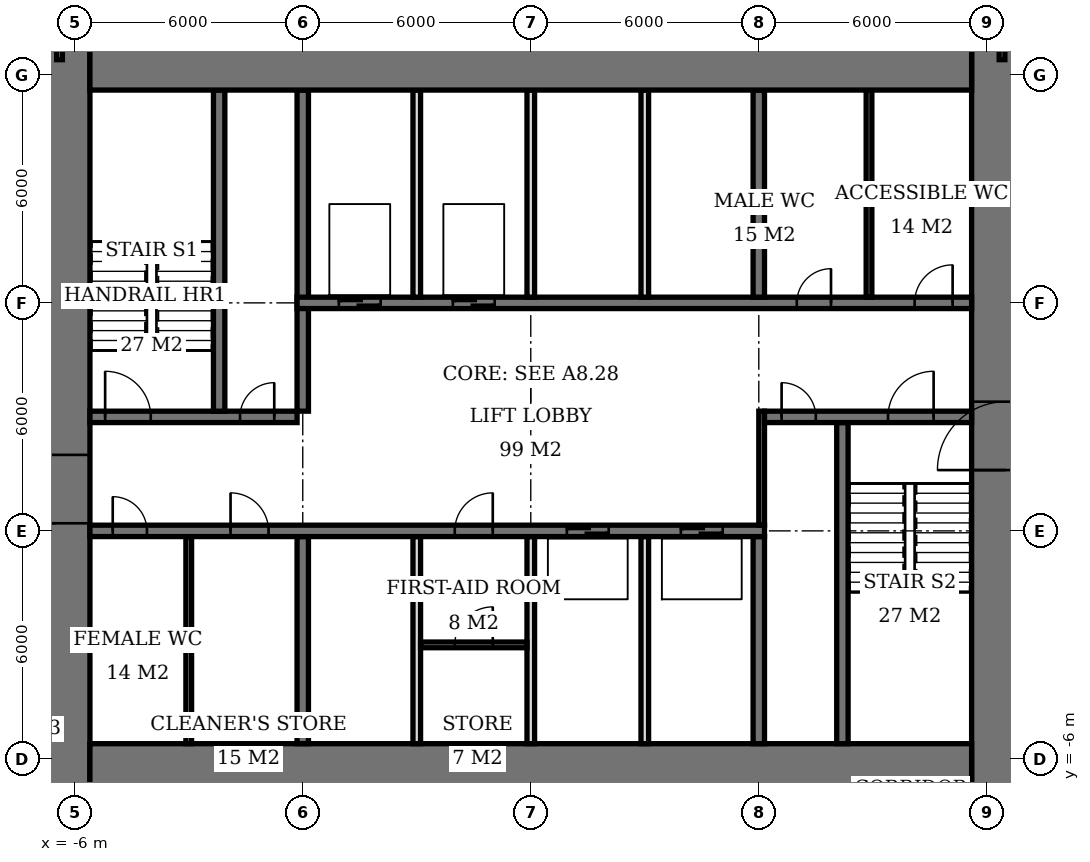
"""IFC4 building model, lengths in metres.
Left out: names, types, materials, properties, quantities, classifications, styles, units other than length and angle.
Written with IfcOpenShell. Run it as: python <this file> out.ifc"""

import sys

from ifc_helpers import new_model, si_unit, direction, frame, frame_2d, origin, place, context, subcontext, project, spatial, rectangle, extrude, element, fill, save


model = new_model("IFC4")
c1 = context("Model", 3, precision=1e-05, world=origin(), true_north=direction((0.0, 1.0)))
c2 = subcontext(c1, "Body", "Model", "MODEL_VIEW")
j1 = project(units=[si_unit("LENGTHUNIT", "METRE"), si_unit("PLANEANGLEUNIT", "RADIAN")], contexts=[c1])
p1 = place(None, origin())
s1 = spatial("IfcSite", under=j1, at=p1, CompositionType="ELEMENT")
p2 = place(p1, origin())
s2 = spatial("IfcBuilding", under=s1, at=p2, CompositionType="ELEMENT")
p3 = place(p2, frame((0.0, 0.0, 276.2)))
s3 = spatial("IfcBuildingStorey", under=s2, at=p3, CompositionType="ELEMENT", Elevation=276.2)
for number, where, z_axis, x_axis in (
    (1, (-5.6, -6.6, 0.0), (0.0, 0.0, 1.0), (1.0, 0.0, 0.0)),
    (2, (-5.6, 12.6, 0.0), (0.0, 0.0, 1.0), (1.0, 0.0, 0.0)),
):
    element("IfcWall", number, at=place(p3, frame(where, z_axis=z_axis, x_axis=x_axis)), inside=s3, PredefinedType="SHEAR", context=c2, shape_type="SweptSolid", body=[
        extrude(rectangle(XDim=23.2, YDim=2.0, at=frame_2d((11.6, 0.0))), origin(), (0.0, 0.0, 1.0), 3.9),
    ])
p4 = place(p3, frame((-6.5, -7.6, 0.0), z_axis=(0.0, 0.0, 1.0), x_axis=(0.0, 1.0, 0.0)))
e3 = element("IfcWall", 3, at=p4, inside=s3, PredefinedType="SHEAR", context=c2, shape_type="SweptSolid", body=[
    extrude(rectangle(XDim=21.2, YDim=1.8, at=frame_2d((10.6, 0.0))), origin(), (0.0, 0.0, 1.0), 3.9),
])
p5 = place(p4, frame((7.8, 0.0, 0.0)))
e4 = element("IfcOpeningElement", 4, at=p5, cuts=e3, PredefinedType="OPENING", context=c2, shape_type="SweptSolid", body=[
    extrude(rectangle(XDim=1.8, YDim=2.4, at=frame_2d((0.9, 1.2))), frame((0.0, 0.91, 0.0), z_axis=(0.0, -1.0, 0.0), x_axis=(1.0, 0.0, 0.0)), (0.0, 0.0, 1.0), 1.82),
])
p6 = place(p3, frame((18.5, -7.6, 0.0), z_axis=(0.0, 0.0, 1.0), x_axis=(0.0, 1.0, 0.0)))
e5 = element("IfcWall", 5, at=p6, inside=s3, PredefinedType="SHEAR", context=c2, shape_type="SweptSolid", body=[
    extrude(rectangle(XDim=21.2, YDim=1.8, at=frame_2d((10.6, 0.0))), origin(), (0.0, 0.0, 1.0), 3.9),
])
p7 = place(p6, frame((9.2, 0.0, 0.0)))
e6 = element("IfcOpeningElement", 6, at=p7, cuts=e5, PredefinedType="OPENING", context=c2, shape_type="SweptSolid", body=[
    extrude(rectangle(XDim=1.8, YDim=2.4, at=frame_2d((0.9, 1.2))), frame((0.0, 0.91, 0.0), z_axis=(0.0, -1.0, 0.0), x_axis=(1.0, 0.0, 0.0)), (0.0, 0.0, 1.0), 1.82),
])
p8 = place(p3, frame((-5.6, 0.0, 0.0), z_axis=(0.0, 0.0, 1.0), x_axis=(1.0, 0.0, 0.0)))
e7 = element("IfcWall", 7, at=p8, inside=s3, PredefinedType="SHEAR", context=c2, shape_type="SweptSolid", body=[
    extrude(rectangle(XDim=17.75, YDim=0.3, at=frame_2d((8.875, 0.0))), origin(), (0.0, 0.0, 1.0), 3.9),
])
p9 = place(p8, frame((0.6, 0.0, 0.0)))
e8 = element("IfcOpeningElement", 8, at=p9, cuts=e7, PredefinedType="OPENING", context=c2, shape_type="SweptSolid", body=[
    extrude(rectangle(XDim=0.9, YDim=2.1, at=frame_2d((0.45, 1.05))), frame((0.0, 0.16, 0.0), z_axis=(0.0, -1.0, 0.0), x_axis=(1.0, 0.0, 0.0)), (0.0, 0.0, 1.0), 0.32),
])
p10 = place(p8, frame((3.7, 0.0, 0.0)))
e9 = element("IfcOpeningElement", 9, at=p10, cuts=e7, PredefinedType="OPENING", context=c2, shape_type="SweptSolid", body=[
    extrude(rectangle(XDim=1.0, YDim=2.1, at=frame_2d((0.5, 1.05))), frame((0.0, 0.16, 0.0), z_axis=(0.0, -1.0, 0.0), x_axis=(1.0, 0.0, 0.0)), (0.0, 0.0, 1.0), 0.32),
])
p11 = place(p8, frame((9.6, 0.0, 0.0)))
e10 = element("IfcOpeningElement", 10, at=p11, cuts=e7, PredefinedType="OPENING", context=c2, shape_type="SweptSolid", body=[
    extrude(rectangle(XDim=1.0, YDim=2.1, at=frame_2d((0.5, 1.05))), frame((0.0, 0.16, 0.0), z_axis=(0.0, -1.0, 0.0), x_axis=(1.0, 0.0, 0.0)), (0.0, 0.0, 1.0), 0.32),
])
p12 = place(p8, frame((12.55, 0.0, 0.0)))
e11 = element("IfcOpeningElement", 11, at=p12, cuts=e7, PredefinedType="OPENING", context=c2, shape_type="SweptSolid", body=[
    extrude(rectangle(XDim=1.1, YDim=2.1, at=frame_2d((0.55, 1.05))), frame((0.0, 0.16, 0.0), z_axis=(0.0, -1.0, 0.0), x_axis=(1.0, 0.0, 0.0)), (0.0, 0.0, 1.0), 0.32),
])
p13 = place(p8, frame((15.55, 0.0, 0.0)))
e12 = element("IfcOpeningElement", 12, at=p13, cuts=e7, PredefinedType="OPENING", context=c2, shape_type="SweptSolid", body=[
    extrude(rectangle(XDim=1.1, YDim=2.1, at=frame_2d((0.55, 1.05))), frame((0.0, 0.16, 0.0), z_axis=(0.0, -1.0, 0.0), x_axis=(1.0, 0.0, 0.0)), (0.0, 0.0, 1.0), 0.32),
])
p14 = place(p3, frame((-5.6, 3.0, 0.0), z_axis=(0.0, 0.0, 1.0), x_axis=(1.0, 0.0, 0.0)))
e13 = element("IfcWall", 13, at=p14, inside=s3, PredefinedType="SHEAR", context=c2, shape_type="SweptSolid", body=[
    extrude(rectangle(XDim=5.45, YDim=0.3, at=frame_2d((2.725, 0.0))), origin(), (0.0, 0.0, 1.0), 3.9),
])
p15 = place(p14, frame((0.4, 0.0, 0.0)))
e14 = element("IfcOpeningElement", 14, at=p15, cuts=e13, PredefinedType="OPENING", context=c2, shape_type="SweptSolid", body=[
    extrude(rectangle(XDim=1.2, YDim=2.1, at=frame_2d((0.6, 1.05))), frame((0.0, 0.16, 0.0), z_axis=(0.0, -1.0, 0.0), x_axis=(1.0, 0.0, 0.0)), (0.0, 0.0, 1.0), 0.32),
])
p16 = place(p14, frame((3.95, 0.0, 0.0)))
e15 = element("IfcOpeningElement", 15, at=p16, cuts=e13, PredefinedType="OPENING", context=c2, shape_type="SweptSolid", body=[
    extrude(rectangle(XDim=0.9, YDim=2.1, at=frame_2d((0.45, 1.05))), frame((0.0, 0.16, 0.0), z_axis=(0.0, -1.0, 0.0), x_axis=(1.0, 0.0, 0.0)), (0.0, 0.0, 1.0), 0.32),
])
p17 = place(p3, frame((12.15, 3.0, 0.0), z_axis=(0.0, 0.0, 1.0), x_axis=(1.0, 0.0, 0.0)))
e16 = element("IfcWall", 16, at=p17, inside=s3, PredefinedType="SHEAR", context=c2, shape_type="SweptSolid", body=[
    extrude(rectangle(XDim=5.45, YDim=0.3, at=frame_2d((2.725, 0.0))), origin(), (0.0, 0.0, 1.0), 3.9),
])
p18 = place(p17, frame((3.25, 0.0, 0.0)))
e17 = element("IfcOpeningElement", 17, at=p18, cuts=e16, PredefinedType="OPENING", context=c2, shape_type="SweptSolid", body=[
    extrude(rectangle(XDim=1.2, YDim=2.1, at=frame_2d((0.6, 1.05))), frame((0.0, 0.16, 0.0), z_axis=(0.0, -1.0, 0.0), x_axis=(1.0, 0.0, 0.0)), (0.0, 0.0, 1.0), 0.32),
])
p19 = place(p17, frame((0.45, 0.0, 0.0)))
e18 = element("IfcOpeningElement", 18, at=p19, cuts=e16, PredefinedType="OPENING", context=c2, shape_type="SweptSolid", body=[
    extrude(rectangle(XDim=0.9, YDim=2.1, at=frame_2d((0.45, 1.05))), frame((0.0, 0.16, 0.0), z_axis=(0.0, -1.0, 0.0), x_axis=(1.0, 0.0, 0.0)), (0.0, 0.0, 1.0), 0.32),
])
p20 = place(p3, frame((-0.15, 6.0, 0.0), z_axis=(0.0, 0.0, 1.0), x_axis=(1.0, 0.0, 0.0)))
e19 = element("IfcWall", 19, at=p20, inside=s3, PredefinedType="SHEAR", context=c2, shape_type="SweptSolid", body=[
    extrude(rectangle(XDim=17.75, YDim=0.3, at=frame_2d((8.875, 0.0))), origin(), (0.0, 0.0, 1.0), 3.9),
])
p21 = place(p20, frame((13.15, 0.0, 0.0)))
e20 = element("IfcOpeningElement", 20, at=p21, cuts=e19, PredefinedType="OPENING", context=c2, shape_type="SweptSolid", body=[
    extrude(rectangle(XDim=0.9, YDim=2.1, at=frame_2d((0.45, 1.05))), frame((0.0, 0.16, 0.0), z_axis=(0.0, -1.0, 0.0), x_axis=(1.0, 0.0, 0.0)), (0.0, 0.0, 1.0), 0.32),
])
p22 = place(p20, frame((16.25, 0.0, 0.0)))
e21 = element("IfcOpeningElement", 21, at=p22, cuts=e19, PredefinedType="OPENING", context=c2, shape_type="SweptSolid", body=[
    extrude(rectangle(XDim=1.0, YDim=2.1, at=frame_2d((0.5, 1.05))), frame((0.0, 0.16, 0.0), z_axis=(0.0, -1.0, 0.0), x_axis=(1.0, 0.0, 0.0)), (0.0, 0.0, 1.0), 0.32),
])
p23 = place(p20, frame((1.1, 0.0, 0.0)))
e22 = element("IfcOpeningElement", 22, at=p23, cuts=e19, PredefinedType="OPENING", context=c2, shape_type="SweptSolid", body=[
    extrude(rectangle(XDim=1.1, YDim=2.1, at=frame_2d((0.55, 1.05))), frame((0.0, 0.16, 0.0), z_axis=(0.0, -1.0, 0.0), x_axis=(1.0, 0.0, 0.0)), (0.0, 0.0, 1.0), 0.32),
])
p24 = place(p20, frame((4.1, 0.0, 0.0)))
e23 = element("IfcOpeningElement", 23, at=p24, cuts=e19, PredefinedType="OPENING", context=c2, shape_type="SweptSolid", body=[
    extrude(rectangle(XDim=1.1, YDim=2.1, at=frame_2d((0.55, 1.05))), frame((0.0, 0.16, 0.0), z_axis=(0.0, -1.0, 0.0), x_axis=(1.0, 0.0, 0.0)), (0.0, 0.0, 1.0), 0.32),
])
p25 = place(p3, frame((0.0, -5.6, 0.0), z_axis=(0.0, 0.0, 1.0), x_axis=(0.0, 1.0, 0.0)))
e24 = element("IfcWall", 24, at=p25, inside=s3, PredefinedType="SHEAR", context=c2, shape_type="SweptSolid", body=[
    extrude(rectangle(XDim=5.45, YDim=0.3, at=frame_2d((2.725, 0.0))), origin(), (0.0, 0.0, 1.0), 3.9),
])
p26 = place(p3, frame((0.0, 3.15, 0.0), z_axis=(0.0, 0.0, 1.0), x_axis=(0.0, 1.0, 0.0)))
e25 = element("IfcWall", 25, at=p26, inside=s3, PredefinedType="SHEAR", context=c2, shape_type="SweptSolid", body=[
    extrude(rectangle(XDim=8.45, YDim=0.3, at=frame_2d((4.225, 0.0))), origin(), (0.0, 0.0, 1.0), 3.9),
])
for number, where, z_axis, x_axis in (
    (26, (12.0, -5.6, 0.0), (0.0, 0.0, 1.0), (0.0, 1.0, 0.0)),
    (27, (12.0, 6.15, 0.0), (0.0, 0.0, 1.0), (0.0, 1.0, 0.0)),
):
    element("IfcWall", number, at=place(p3, frame(where, z_axis=z_axis, x_axis=x_axis)), inside=s3, PredefinedType="SHEAR", context=c2, shape_type="SweptSolid", body=[
        extrude(rectangle(XDim=5.45, YDim=0.3, at=frame_2d((2.725, 0.0))), origin(), (0.0, 0.0, 1.0), 3.9),
    ])
for number, where, z_axis, x_axis in (
    (28, (-2.2, 3.15, 0.0), (0.0, 0.0, 1.0), (0.0, 1.0, 0.0)),
    (29, (14.2, -5.6, 0.0), (0.0, 0.0, 1.0), (0.0, 1.0, 0.0)),
):
    element("IfcWall", number, at=place(p3, frame(where, z_axis=z_axis, x_axis=x_axis)), inside=s3, PredefinedType="SHEAR", context=c2, shape_type="SweptSolid", body=[
        extrude(rectangle(XDim=8.45, YDim=0.3, at=frame_2d((4.225, 0.0))), origin(), (0.0, 0.0, 1.0), 3.9),
    ])
for number, where, z_axis, x_axis in (
    (30, (3.0, 6.15, 0.0), (0.0, 0.0, 1.0), (0.0, 1.0, 0.0)),
    (31, (6.0, 6.15, 0.0), (0.0, 0.0, 1.0), (0.0, 1.0, 0.0)),
    (32, (9.0, 6.15, 0.0), (0.0, 0.0, 1.0), (0.0, 1.0, 0.0)),
    (33, (3.0, -5.6, 0.0), (0.0, 0.0, 1.0), (0.0, 1.0, 0.0)),
    (34, (6.0, -5.6, 0.0), (0.0, 0.0, 1.0), (0.0, 1.0, 0.0)),
    (35, (9.0, -5.6, 0.0), (0.0, 0.0, 1.0), (0.0, 1.0, 0.0)),
):
    element("IfcWall", number, at=place(p3, frame(where, z_axis=z_axis, x_axis=x_axis)), inside=s3, PredefinedType="SOLIDWALL", context=c2, shape_type="SweptSolid", body=[
        extrude(rectangle(XDim=5.45, YDim=0.2, at=frame_2d((2.725, 0.0))), origin(), (0.0, 0.0, 1.0), 3.9),
    ])
for number, where, z_axis, x_axis in (
    (36, (-3.0, -5.6, 0.0), (0.0, 0.0, 1.0), (0.0, 1.0, 0.0)),
    (37, (14.9, 6.15, 0.0), (0.0, 0.0, 1.0), (0.0, 1.0, 0.0)),
):
    element("IfcWall", number, at=place(p3, frame(where, z_axis=z_axis, x_axis=x_axis)), inside=s3, PredefinedType="PLUMBINGWALL", context=c2, shape_type="SweptSolid", body=[
        extrude(rectangle(XDim=5.45, YDim=0.15, at=frame_2d((2.725, 0.0))), origin(), (0.0, 0.0, 1.0), 3.65),
    ])
p27 = place(p3, frame((3.1, -3.0, 0.0), z_axis=(0.0, 0.0, 1.0), x_axis=(1.0, 0.0, 0.0)))
e38 = element("IfcWall", 38, at=p27, inside=s3, PredefinedType="PARTITIONING", context=c2, shape_type="SweptSolid", body=[
    extrude(rectangle(XDim=2.8, YDim=0.15, at=frame_2d((1.4, 0.0))), origin(), (0.0, 0.0, 1.0), 3.65),
])
p28 = place(p27, frame((0.9, 0.0, 0.0)))
e39 = element("IfcOpeningElement", 39, at=p28, cuts=e38, PredefinedType="OPENING", context=c2, shape_type="SweptSolid", body=[
    extrude(rectangle(XDim=1.0, YDim=2.1, at=frame_2d((0.5, 1.05))), frame((0.0, 0.085, 0.0), z_axis=(0.0, -1.0, 0.0), x_axis=(1.0, 0.0, 0.0)), (0.0, 0.0, 1.0), 0.17),
])
for number, where, z_axis, x_axis in (
    (40, (-6.4, 12.4, 0.0), (0.0, 0.0, 1.0), (0.0, 1.0, 0.0)),
    (41, (18.4, 12.4, 0.0), (0.0, 0.0, 1.0), (0.0, 1.0, 0.0)),
):
    element("IfcWall", number, at=place(p3, frame(where, z_axis=z_axis, x_axis=x_axis)), inside=s3, PredefinedType="PARTITIONING", context=c2, shape_type="SweptSolid", body=[
        extrude(rectangle(XDim=1.2, YDim=0.15, at=frame_2d((0.6, 0.0))), origin(), (0.0, 0.0, 1.0), 3.65),
    ])
p29 = place(p3, frame((12.075, 0.15, 0.0), z_axis=(0.0, 0.0, 1.0), x_axis=(0.0, 1.0, 0.0)))
e42 = element("IfcWall", 42, at=p29, inside=s3, PredefinedType="PARTITIONING", context=c2, shape_type="SweptSolid", body=[
    extrude(rectangle(XDim=3.0, YDim=0.15, at=frame_2d((1.5, 0.0))), origin(), (0.0, 0.0, 1.0), 3.65),
])
p30 = place(p5, origin())
e43 = element("IfcDoor", 43, at=p30, inside=s3, OperationType="DOUBLE_DOOR_SINGLE_SWING", PredefinedType="DOOR", context=c2, shape_type="SweptSolid", body=[
    extrude(rectangle(XDim=1.8, YDim=2.4, at=frame_2d((0.9, 1.2))), frame((0.0, 0.025, 0.0), z_axis=(0.0, -1.0, 0.0), x_axis=(1.0, 0.0, 0.0)), (0.0, 0.0, 1.0), 0.05),
])
fill(e4, e43)
p31 = place(p7, origin())
e44 = element("IfcDoor", 44, at=p31, inside=s3, OperationType="DOUBLE_DOOR_SINGLE_SWING", PredefinedType="DOOR", context=c2, shape_type="SweptSolid", body=[
    extrude(rectangle(XDim=1.8, YDim=2.4, at=frame_2d((0.9, 1.2))), frame((0.0, 0.025, 0.0), z_axis=(0.0, -1.0, 0.0), x_axis=(1.0, 0.0, 0.0)), (0.0, 0.0, 1.0), 0.05),
])
fill(e6, e44)
p32 = place(p15, origin())
e45 = element("IfcDoor", 45, at=p32, inside=s3, OperationType="SINGLE_SWING_LEFT", PredefinedType="DOOR", context=c2, shape_type="SweptSolid", body=[
    extrude(rectangle(XDim=1.2, YDim=2.1, at=frame_2d((0.6, 1.05))), frame((0.0, 0.025, 0.0), z_axis=(0.0, -1.0, 0.0), x_axis=(1.0, 0.0, 0.0)), (0.0, 0.0, 1.0), 0.05),
])
fill(e14, e45)
p33 = place(p16, origin())
e46 = element("IfcDoor", 46, at=p33, inside=s3, OperationType="SINGLE_SWING_RIGHT", PredefinedType="DOOR", context=c2, shape_type="SweptSolid", body=[
    extrude(rectangle(XDim=0.9, YDim=2.1, at=frame_2d((0.45, 1.05))), frame((0.0, 0.025, 0.0), z_axis=(0.0, -1.0, 0.0), x_axis=(1.0, 0.0, 0.0)), (0.0, 0.0, 1.0), 0.05),
])
fill(e15, e46)
p34 = place(p18, origin())
e47 = element("IfcDoor", 47, at=p34, inside=s3, OperationType="SINGLE_SWING_RIGHT", PredefinedType="DOOR", context=c2, shape_type="SweptSolid", body=[
    extrude(rectangle(XDim=1.2, YDim=2.1, at=frame_2d((0.6, 1.05))), frame((0.0, 0.025, 0.0), z_axis=(0.0, -1.0, 0.0), x_axis=(1.0, 0.0, 0.0)), (0.0, 0.0, 1.0), 0.05),
])
fill(e17, e47)
p35 = place(p19, origin())
e48 = element("IfcDoor", 48, at=p35, inside=s3, OperationType="SINGLE_SWING_LEFT", PredefinedType="DOOR", context=c2, shape_type="SweptSolid", body=[
    extrude(rectangle(XDim=0.9, YDim=2.1, at=frame_2d((0.45, 1.05))), frame((0.0, 0.025, 0.0), z_axis=(0.0, -1.0, 0.0), x_axis=(1.0, 0.0, 0.0)), (0.0, 0.0, 1.0), 0.05),
])
fill(e18, e48)
p36 = place(p9, origin())
e49 = element("IfcDoor", 49, at=p36, inside=s3, OperationType="SINGLE_SWING_LEFT", PredefinedType="DOOR", context=c2, shape_type="SweptSolid", body=[
    extrude(rectangle(XDim=0.9, YDim=2.1, at=frame_2d((0.45, 1.05))), frame((0.0, 0.025, 0.0), z_axis=(0.0, -1.0, 0.0), x_axis=(1.0, 0.0, 0.0)), (0.0, 0.0, 1.0), 0.05),
])
fill(e8, e49)
p37 = place(p10, origin())
e50 = element("IfcDoor", 50, at=p37, inside=s3, OperationType="SINGLE_SWING_LEFT", PredefinedType="DOOR", context=c2, shape_type="SweptSolid", body=[
    extrude(rectangle(XDim=1.0, YDim=2.1, at=frame_2d((0.5, 1.05))), frame((0.0, 0.025, 0.0), z_axis=(0.0, -1.0, 0.0), x_axis=(1.0, 0.0, 0.0)), (0.0, 0.0, 1.0), 0.05),
])
fill(e9, e50)
p38 = place(p21, origin())
e51 = element("IfcDoor", 51, at=p38, inside=s3, OperationType="SINGLE_SWING_RIGHT", PredefinedType="DOOR", context=c2, shape_type="SweptSolid", body=[
    extrude(rectangle(XDim=0.9, YDim=2.1, at=frame_2d((0.45, 1.05))), frame((0.0, 0.025, 0.0), z_axis=(0.0, -1.0, 0.0), x_axis=(1.0, 0.0, 0.0)), (0.0, 0.0, 1.0), 0.05),
])
fill(e20, e51)
p39 = place(p22, origin())
e52 = element("IfcDoor", 52, at=p39, inside=s3, OperationType="SINGLE_SWING_RIGHT", PredefinedType="DOOR", context=c2, shape_type="SweptSolid", body=[
    extrude(rectangle(XDim=1.0, YDim=2.1, at=frame_2d((0.5, 1.05))), frame((0.0, 0.025, 0.0), z_axis=(0.0, -1.0, 0.0), x_axis=(1.0, 0.0, 0.0)), (0.0, 0.0, 1.0), 0.05),
])
fill(e21, e52)
p40 = place(p28, origin())
e53 = element("IfcDoor", 53, at=p40, inside=s3, OperationType="SINGLE_SWING_RIGHT", PredefinedType="DOOR", context=c2, shape_type="SweptSolid", body=[
    extrude(rectangle(XDim=1.0, YDim=2.1, at=frame_2d((0.5, 1.05))), frame((0.0, 0.025, 0.0), z_axis=(0.0, -1.0, 0.0), x_axis=(1.0, 0.0, 0.0)), (0.0, 0.0, 1.0), 0.05),
])
fill(e39, e53)
p41 = place(p11, origin())
e54 = element("IfcDoor", 54, at=p41, inside=s3, OperationType="SINGLE_SWING_RIGHT", PredefinedType="DOOR", context=c2, shape_type="SweptSolid", body=[
    extrude(rectangle(XDim=1.0, YDim=2.1, at=frame_2d((0.5, 1.05))), frame((0.0, 0.025, 0.0), z_axis=(0.0, -1.0, 0.0), x_axis=(1.0, 0.0, 0.0)), (0.0, 0.0, 1.0), 0.05),
])
fill(e10, e54)
p42 = place(p23, origin())
e55 = element("IfcDoor", 55, at=p42, inside=s3, OperationType="DOUBLE_DOOR_SLIDING", PredefinedType="USERDEFINED", context=c2, shape_type="SweptSolid", body=[
    extrude(rectangle(XDim=1.1, YDim=2.1, at=frame_2d((0.55, 1.05))), frame((0.0, 0.025, 0.0), z_axis=(0.0, -1.0, 0.0), x_axis=(1.0, 0.0, 0.0)), (0.0, 0.0, 1.0), 0.05),
])
fill(e22, e55)
p43 = place(p24, origin())
e56 = element("IfcDoor", 56, at=p43, inside=s3, OperationType="DOUBLE_DOOR_SLIDING", PredefinedType="USERDEFINED", context=c2, shape_type="SweptSolid", body=[
    extrude(rectangle(XDim=1.1, YDim=2.1, at=frame_2d((0.55, 1.05))), frame((0.0, 0.025, 0.0), z_axis=(0.0, -1.0, 0.0), x_axis=(1.0, 0.0, 0.0)), (0.0, 0.0, 1.0), 0.05),
])
fill(e23, e56)
p44 = place(p12, origin())
e57 = element("IfcDoor", 57, at=p44, inside=s3, OperationType="DOUBLE_DOOR_SLIDING", PredefinedType="USERDEFINED", context=c2, shape_type="SweptSolid", body=[
    extrude(rectangle(XDim=1.1, YDim=2.1, at=frame_2d((0.55, 1.05))), frame((0.0, 0.025, 0.0), z_axis=(0.0, -1.0, 0.0), x_axis=(1.0, 0.0, 0.0)), (0.0, 0.0, 1.0), 0.05),
])
fill(e11, e57)
p45 = place(p13, origin())
e58 = element("IfcDoor", 58, at=p45, inside=s3, OperationType="DOUBLE_DOOR_SLIDING", PredefinedType="USERDEFINED", context=c2, shape_type="SweptSolid", body=[
    extrude(rectangle(XDim=1.1, YDim=2.1, at=frame_2d((0.55, 1.05))), frame((0.0, 0.025, 0.0), z_axis=(0.0, -1.0, 0.0), x_axis=(1.0, 0.0, 0.0)), (0.0, 0.0, 1.0), 0.05),
])
fill(e12, e58)
save(model, sys.argv[1])
